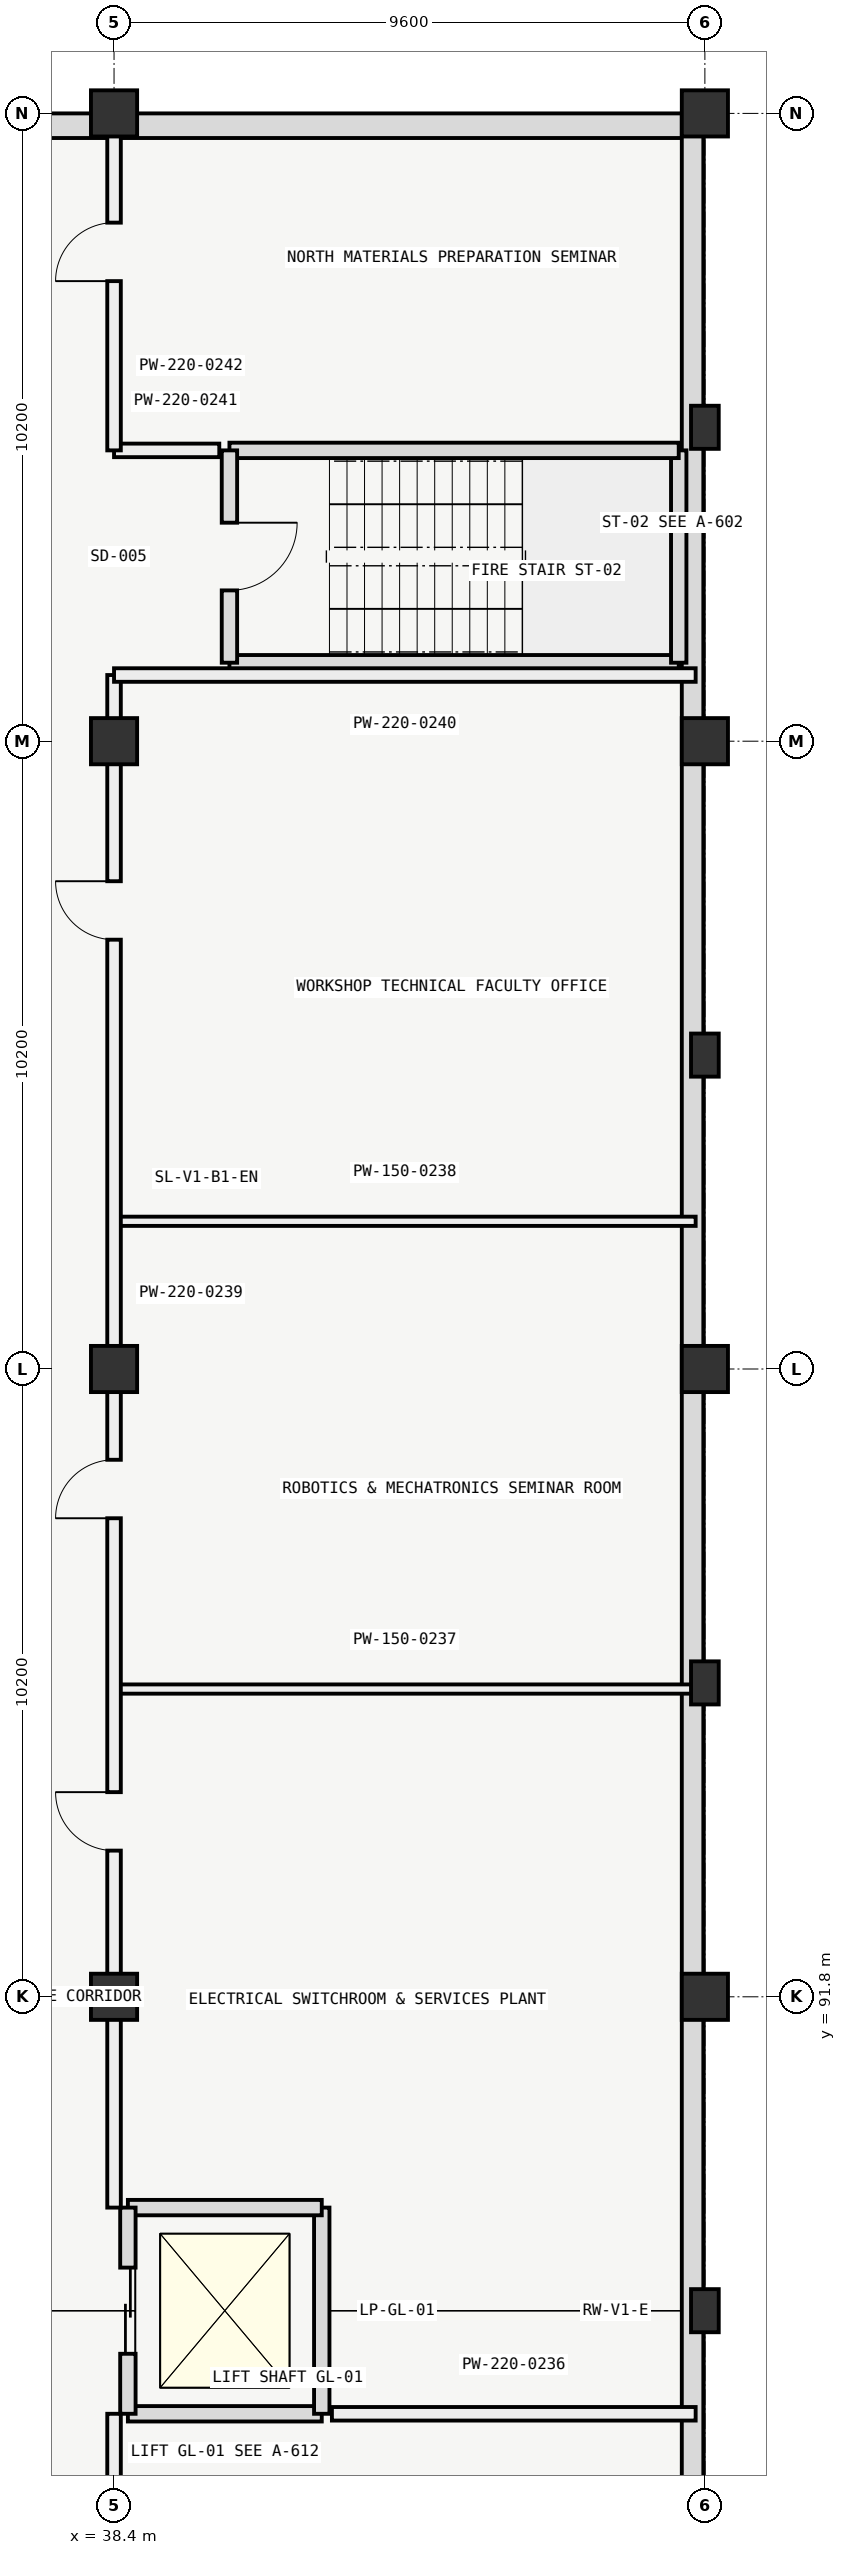
"""IFC4 building model, lengths in metres.
Left out: names, types, materials, properties, quantities, classifications, styles, units other than length and angle.
Written with IfcOpenShell. Run it as: python <this file> out.ifc"""

import sys

from ifc_helpers import new_model, si_unit, direction, frame, frame_2d, origin, origin_2d, place, context, subcontext, project, spatial, rectangle, extrude, element, fill, save


model = new_model("IFC4")
c1 = context("Model", 3, precision=1e-05, world=origin(), true_north=direction((0.0, 1.0)))
c2 = subcontext(c1, "Body", "Model", "MODEL_VIEW")
j1 = project(units=[si_unit("LENGTHUNIT", "METRE"), si_unit("PLANEANGLEUNIT", "RADIAN")], contexts=[c1])
p1 = place(None, origin())
s1 = spatial("IfcSite", under=j1, at=p1, CompositionType="ELEMENT")
p2 = place(p1, origin())
s2 = spatial("IfcBuilding", under=s1, at=p2, CompositionType="ELEMENT")
p3 = place(p2, frame((0.0, 0.0, -4.2)))
s3 = spatial("IfcBuildingStorey", under=s2, at=p3, CompositionType="ELEMENT", Elevation=-4.2)
for number, where, z_axis, x_axis in (
    (1, (38.4, 91.8, 0.0), (0.0, 0.0, 1.0), (1.0, 0.0, 0.0)),
    (2, (48.0, 91.8, 0.0), (0.0, 0.0, 1.0), (1.0, 0.0, 0.0)),
    (3, (38.4, 102.0, 0.0), (0.0, 0.0, 1.0), (1.0, 0.0, 0.0)),
    (4, (48.0, 102.0, 0.0), (0.0, 0.0, 1.0), (1.0, 0.0, 0.0)),
    (5, (38.4, 112.2, 0.0), (0.0, 0.0, 1.0), (1.0, 0.0, 0.0)),
    (6, (48.0, 112.2, 0.0), (0.0, 0.0, 1.0), (1.0, 0.0, 0.0)),
    (7, (38.4, 122.4, 0.0), (0.0, 0.0, 1.0), (1.0, 0.0, 0.0)),
    (8, (48.0, 122.4, 0.0), (0.0, 0.0, 1.0), (1.0, 0.0, 0.0)),
):
    element("IfcColumn", number, at=place(p3, frame(where, z_axis=z_axis, x_axis=x_axis)), inside=s3, PredefinedType="COLUMN", context=c2, shape_type="SweptSolid", body=[
        extrude(rectangle(XDim=0.75, YDim=0.75, at=origin_2d()), origin(), (0.0, 0.0, 1.0), 4.2),
    ])
for number, where, z_axis, x_axis in (
    (9, (48.0, 86.7, 0.0), (0.0, 0.0, 1.0), (1.0, 0.0, 0.0)),
    (10, (48.0, 96.9, 0.0), (0.0, 0.0, 1.0), (1.0, 0.0, 0.0)),
    (11, (48.0, 107.1, 0.0), (0.0, 0.0, 1.0), (1.0, 0.0, 0.0)),
    (12, (48.0, 117.3, 0.0), (0.0, 0.0, 1.0), (1.0, 0.0, 0.0)),
):
    element("IfcColumn", number, at=place(p3, frame(where, z_axis=z_axis, x_axis=x_axis)), inside=s3, PredefinedType="PILASTER", context=c2, shape_type="SweptSolid", body=[
        extrude(rectangle(XDim=0.45, YDim=0.7, at=origin_2d()), origin(), (0.0, 0.0, 1.0), 4.2),
    ])
p4 = place(p3, frame((0.2, 122.2, 0.0), z_axis=(0.0, 0.0, 1.0), x_axis=(1.0, 0.0, 0.0)))
e13 = element("IfcWall", 13, at=p4, inside=s3, PredefinedType="USERDEFINED", context=c2, shape_type="SweptSolid", body=[
    extrude(rectangle(XDim=47.6, YDim=0.4, at=frame_2d((23.8, 0.0))), origin(), (0.0, 0.0, 1.0), 3.9),
])
p5 = place(p3, frame((47.8, 51.0, 0.0), z_axis=(0.0, 0.0, 1.0), x_axis=(0.0, 1.0, 0.0)))
e14 = element("IfcWall", 14, at=p5, inside=s3, PredefinedType="USERDEFINED", context=c2, shape_type="SweptSolid", body=[
    extrude(rectangle(XDim=71.4, YDim=0.35, at=frame_2d((35.7, 0.0))), origin(), (0.0, 0.0, 1.0), 3.9),
])
p6 = place(p3, frame((40.275, 113.475, 0.0), z_axis=(0.0, 0.0, 1.0), x_axis=(1.0, 0.0, 0.0)))
e15 = element("IfcWall", 15, at=p6, inside=s3, PredefinedType="SOLIDWALL", context=c2, shape_type="SweptSolid", body=[
    extrude(rectangle(XDim=7.3, YDim=0.25, at=frame_2d((3.65, 0.0))), origin(), (0.0, 0.0, 1.0), 3.9),
])
p7 = place(p3, frame((47.575, 113.475, 0.0), z_axis=(0.0, 0.0, 1.0), x_axis=(0.0, 1.0, 0.0)))
e16 = element("IfcWall", 16, at=p7, inside=s3, PredefinedType="SOLIDWALL", context=c2, shape_type="SweptSolid", body=[
    extrude(rectangle(XDim=3.45, YDim=0.25, at=frame_2d((1.725, 0.0))), origin(), (0.0, 0.0, 1.0), 3.9),
])
p8 = place(p3, frame((47.575, 116.925, 0.0), z_axis=(0.0, 0.0, 1.0), x_axis=(-1.0, 0.0, 0.0)))
e17 = element("IfcWall", 17, at=p8, inside=s3, PredefinedType="SOLIDWALL", context=c2, shape_type="SweptSolid", body=[
    extrude(rectangle(XDim=7.3, YDim=0.25, at=frame_2d((3.65, 0.0))), origin(), (0.0, 0.0, 1.0), 3.9),
])
p9 = place(p3, frame((40.275, 116.925, 0.0), z_axis=(0.0, 0.0, 1.0), x_axis=(0.0, -1.0, 0.0)))
e18 = element("IfcWall", 18, at=p9, inside=s3, PredefinedType="SOLIDWALL", context=c2, shape_type="SweptSolid", body=[
    extrude(rectangle(XDim=3.45, YDim=0.25, at=frame_2d((1.725, 0.0))), origin(), (0.0, 0.0, 1.0), 3.9),
])
p10 = place(p9, frame((1.175, 0.0, 0.0)))
e19 = element("IfcOpeningElement", 19, at=p10, cuts=e18, PredefinedType="OPENING", context=c2, shape_type="SweptSolid", body=[
    extrude(rectangle(XDim=1.1, YDim=2.2, at=frame_2d((0.55, 1.1))), frame((0.0, 0.135, 0.0), z_axis=(0.0, -1.0, 0.0), x_axis=(1.0, 0.0, 0.0)), (0.0, 0.0, 1.0), 0.27),
])
p11 = place(p3, frame((38.625, 85.025, -0.3), z_axis=(0.0, 0.0, 1.0), x_axis=(1.0, 0.0, 0.0)))
e20 = element("IfcWall", 20, at=p11, inside=s3, PredefinedType="SOLIDWALL", context=c2, shape_type="SweptSolid", body=[
    extrude(rectangle(XDim=3.15, YDim=0.25, at=frame_2d((1.575, 0.0))), origin(), (0.0, 0.0, 1.0), 4.2),
])
p12 = place(p3, frame((41.775, 85.025, -0.3), z_axis=(0.0, 0.0, 1.0), x_axis=(0.0, 1.0, 0.0)))
e21 = element("IfcWall", 21, at=p12, inside=s3, PredefinedType="SOLIDWALL", context=c2, shape_type="SweptSolid", body=[
    extrude(rectangle(XDim=3.35, YDim=0.25, at=frame_2d((1.675, 0.0))), origin(), (0.0, 0.0, 1.0), 4.2),
])
p13 = place(p3, frame((41.775, 88.375, -0.3), z_axis=(0.0, 0.0, 1.0), x_axis=(-1.0, 0.0, 0.0)))
e22 = element("IfcWall", 22, at=p13, inside=s3, PredefinedType="SOLIDWALL", context=c2, shape_type="SweptSolid", body=[
    extrude(rectangle(XDim=3.15, YDim=0.25, at=frame_2d((1.575, 0.0))), origin(), (0.0, 0.0, 1.0), 4.2),
])
p14 = place(p3, frame((38.625, 88.375, -0.3), z_axis=(0.0, 0.0, 1.0), x_axis=(0.0, -1.0, 0.0)))
e23 = element("IfcWall", 23, at=p14, inside=s3, PredefinedType="SOLIDWALL", context=c2, shape_type="SweptSolid", body=[
    extrude(rectangle(XDim=3.35, YDim=0.25, at=frame_2d((1.675, 0.0))), origin(), (0.0, 0.0, 1.0), 4.2),
])
p15 = place(p14, frame((0.975, 0.0, 0.3)))
e24 = element("IfcOpeningElement", 24, at=p15, cuts=e23, PredefinedType="OPENING", context=c2, shape_type="SweptSolid", body=[
    extrude(rectangle(XDim=1.4, YDim=2.2, at=frame_2d((0.7, 1.1))), frame((0.0, 0.135, 0.0), z_axis=(0.0, -1.0, 0.0), x_axis=(1.0, 0.0, 0.0)), (0.0, 0.0, 1.0), 0.27),
])
p16 = place(p3, frame((38.4, 58.325, 0.0), z_axis=(0.0, 0.0, 1.0), x_axis=(0.0, 1.0, 0.0)))
e25 = element("IfcWall", 25, at=p16, inside=s3, PredefinedType="PARTITIONING", context=c2, shape_type="SweptSolid", body=[
    extrude(rectangle(XDim=26.7, YDim=0.22, at=frame_2d((13.35, 0.0))), origin(), (0.0, 0.0, 1.0), 3.268),
])
p17 = place(p16, frame((1.35, 0.0, 0.0)))
e26 = element("IfcOpeningElement", 26, at=p17, cuts=e25, PredefinedType="OPENING", context=c2, shape_type="SweptSolid", body=[
    extrude(rectangle(XDim=0.95, YDim=2.1, at=frame_2d((0.475, 1.05))), frame((0.0, 0.12, 0.0), z_axis=(0.0, -1.0, 0.0), x_axis=(1.0, 0.0, 0.0)), (0.0, 0.0, 1.0), 0.24),
])
p18 = place(p16, frame((6.08, 0.0, 0.0)))
e27 = element("IfcOpeningElement", 27, at=p18, cuts=e25, PredefinedType="OPENING", context=c2, shape_type="SweptSolid", body=[
    extrude(rectangle(XDim=0.9, YDim=2.05, at=frame_2d((0.45, 1.025))), frame((0.0, 0.12, 0.0), z_axis=(0.0, -1.0, 0.0), x_axis=(1.0, 0.0, 0.0)), (0.0, 0.0, 1.0), 0.24),
])
p19 = place(p16, frame((10.6, 0.0, 0.0)))
e28 = element("IfcOpeningElement", 28, at=p19, cuts=e25, PredefinedType="OPENING", context=c2, shape_type="SweptSolid", body=[
    extrude(rectangle(XDim=0.95, YDim=2.1, at=frame_2d((0.475, 1.05))), frame((0.0, 0.12, 0.0), z_axis=(0.0, -1.0, 0.0), x_axis=(1.0, 0.0, 0.0)), (0.0, 0.0, 1.0), 0.24),
])
p20 = place(p16, frame((20.3, 0.0, 0.0)))
e29 = element("IfcOpeningElement", 29, at=p20, cuts=e25, PredefinedType="OPENING", context=c2, shape_type="SweptSolid", body=[
    extrude(rectangle(XDim=0.95, YDim=2.1, at=frame_2d((0.475, 1.05))), frame((0.0, 0.12, 0.0), z_axis=(0.0, -1.0, 0.0), x_axis=(1.0, 0.0, 0.0)), (0.0, 0.0, 1.0), 0.24),
])
p21 = place(p3, frame((41.94, 85.025, 0.0), z_axis=(0.0, 0.0, 1.0), x_axis=(1.0, 0.0, 0.0)))
e30 = element("IfcWall", 30, at=p21, inside=s3, PredefinedType="PARTITIONING", context=c2, shape_type="SweptSolid", body=[
    extrude(rectangle(XDim=5.91, YDim=0.22, at=frame_2d((2.955, 0.0))), origin(), (0.0, 0.0, 1.0), 3.23),
])
for number, where, z_axis, x_axis in (
    (31, (38.4, 96.8, 0.0), (0.0, 0.0, 1.0), (1.0, 0.0, 0.0)),
    (32, (38.4, 104.4, 0.0), (0.0, 0.0, 1.0), (1.0, 0.0, 0.0)),
):
    element("IfcWall", number, at=place(p3, frame(where, z_axis=z_axis, x_axis=x_axis)), inside=s3, PredefinedType="PARTITIONING", context=c2, shape_type="SweptSolid", body=[
        extrude(rectangle(XDim=9.45, YDim=0.15, at=frame_2d((4.725, 0.0))), origin(), (0.0, 0.0, 1.0), 3.423),
    ])
p22 = place(p3, frame((38.4, 88.375, 0.0), z_axis=(0.0, 0.0, 1.0), x_axis=(0.0, 1.0, 0.0)))
e33 = element("IfcWall", 33, at=p22, inside=s3, PredefinedType="PARTITIONING", context=c2, shape_type="SweptSolid", body=[
    extrude(rectangle(XDim=24.9, YDim=0.22, at=frame_2d((12.45, 0.0))), origin(), (0.0, 0.0, 1.0), 3.268),
])
p23 = place(p22, frame((5.8, 0.0, 0.0)))
e34 = element("IfcOpeningElement", 34, at=p23, cuts=e33, PredefinedType="OPENING", context=c2, shape_type="SweptSolid", body=[
    extrude(rectangle(XDim=0.95, YDim=2.1, at=frame_2d((0.475, 1.05))), frame((0.0, 0.12, 0.0), z_axis=(0.0, -1.0, 0.0), x_axis=(1.0, 0.0, 0.0)), (0.0, 0.0, 1.0), 0.24),
])
p24 = place(p22, frame((11.2, 0.0, 0.0)))
e35 = element("IfcOpeningElement", 35, at=p24, cuts=e33, PredefinedType="OPENING", context=c2, shape_type="SweptSolid", body=[
    extrude(rectangle(XDim=0.95, YDim=2.1, at=frame_2d((0.475, 1.05))), frame((0.0, 0.12, 0.0), z_axis=(0.0, -1.0, 0.0), x_axis=(1.0, 0.0, 0.0)), (0.0, 0.0, 1.0), 0.24),
])
p25 = place(p22, frame((20.6, 0.0, 0.0)))
e36 = element("IfcOpeningElement", 36, at=p25, cuts=e33, PredefinedType="OPENING", context=c2, shape_type="SweptSolid", body=[
    extrude(rectangle(XDim=0.95, YDim=2.1, at=frame_2d((0.475, 1.05))), frame((0.0, 0.12, 0.0), z_axis=(0.0, -1.0, 0.0), x_axis=(1.0, 0.0, 0.0)), (0.0, 0.0, 1.0), 0.24),
])
p26 = place(p3, frame((38.4, 113.275, 0.0), z_axis=(0.0, 0.0, 1.0), x_axis=(1.0, 0.0, 0.0)))
e37 = element("IfcWall", 37, at=p26, inside=s3, PredefinedType="PARTITIONING", context=c2, shape_type="SweptSolid", body=[
    extrude(rectangle(XDim=9.45, YDim=0.22, at=frame_2d((4.725, 0.0))), origin(), (0.0, 0.0, 1.0), 3.23),
])
p27 = place(p3, frame((38.4, 116.925, 0.0), z_axis=(0.0, 0.0, 1.0), x_axis=(1.0, 0.0, 0.0)))
e38 = element("IfcWall", 38, at=p27, inside=s3, PredefinedType="PARTITIONING", context=c2, shape_type="SweptSolid", body=[
    extrude(rectangle(XDim=1.71, YDim=0.22, at=frame_2d((0.855, 0.0))), origin(), (0.0, 0.0, 1.0), 3.423),
])
p28 = place(p3, frame((38.4, 116.925, 0.0), z_axis=(0.0, 0.0, 1.0), x_axis=(0.0, 1.0, 0.0)))
e39 = element("IfcWall", 39, at=p28, inside=s3, PredefinedType="PARTITIONING", context=c2, shape_type="SweptSolid", body=[
    extrude(rectangle(XDim=5.325, YDim=0.22, at=frame_2d((2.663, 0.0))), origin(), (0.0, 0.0, 1.0), 3.423),
])
p29 = place(p28, frame((2.75, 0.0, 0.0)))
e40 = element("IfcOpeningElement", 40, at=p29, cuts=e39, PredefinedType="OPENING", context=c2, shape_type="SweptSolid", body=[
    extrude(rectangle(XDim=0.95, YDim=2.1, at=frame_2d((0.475, 1.05))), frame((0.0, 0.12, 0.0), z_axis=(0.0, -1.0, 0.0), x_axis=(1.0, 0.0, 0.0)), (0.0, 0.0, 1.0), 0.24),
])
p30 = place(p10, origin())
e41 = element("IfcDoor", 41, at=p30, inside=s3, OperationType="SINGLE_SWING_LEFT", PredefinedType="DOOR", context=c2, shape_type="SweptSolid", body=[
    extrude(rectangle(XDim=1.1, YDim=2.2, at=frame_2d((0.55, 1.1))), frame((0.0, 0.025, 0.0), z_axis=(0.0, -1.0, 0.0), x_axis=(1.0, 0.0, 0.0)), (0.0, 0.0, 1.0), 0.05),
])
fill(e19, e41)
p31 = place(p15, origin())
e42 = element("IfcDoor", 42, at=p31, inside=s3, OperationType="DOUBLE_DOOR_SLIDING", PredefinedType="DOOR", context=c2, shape_type="SweptSolid", body=[
    extrude(rectangle(XDim=1.4, YDim=2.2, at=frame_2d((0.7, 1.1))), frame((0.0, 0.025, 0.0), z_axis=(0.0, -1.0, 0.0), x_axis=(1.0, 0.0, 0.0)), (0.0, 0.0, 1.0), 0.05),
])
fill(e24, e42)
p32 = place(p23, origin())
e43 = element("IfcDoor", 43, at=p32, inside=s3, OperationType="SINGLE_SWING_RIGHT", PredefinedType="DOOR", context=c2, shape_type="SweptSolid", body=[
    extrude(rectangle(XDim=0.95, YDim=2.1, at=frame_2d((0.475, 1.05))), frame((0.0, 0.025, 0.0), z_axis=(0.0, -1.0, 0.0), x_axis=(1.0, 0.0, 0.0)), (0.0, 0.0, 1.0), 0.05),
])
fill(e34, e43)
p33 = place(p24, origin())
e44 = element("IfcDoor", 44, at=p33, inside=s3, OperationType="SINGLE_SWING_LEFT", PredefinedType="DOOR", context=c2, shape_type="SweptSolid", body=[
    extrude(rectangle(XDim=0.95, YDim=2.1, at=frame_2d((0.475, 1.05))), frame((0.0, 0.025, 0.0), z_axis=(0.0, -1.0, 0.0), x_axis=(1.0, 0.0, 0.0)), (0.0, 0.0, 1.0), 0.05),
])
fill(e35, e44)
p34 = place(p25, origin())
e45 = element("IfcDoor", 45, at=p34, inside=s3, OperationType="SINGLE_SWING_RIGHT", PredefinedType="DOOR", context=c2, shape_type="SweptSolid", body=[
    extrude(rectangle(XDim=0.95, YDim=2.1, at=frame_2d((0.475, 1.05))), frame((0.0, 0.025, 0.0), z_axis=(0.0, -1.0, 0.0), x_axis=(1.0, 0.0, 0.0)), (0.0, 0.0, 1.0), 0.05),
])
fill(e36, e45)
p35 = place(p29, origin())
e46 = element("IfcDoor", 46, at=p35, inside=s3, OperationType="SINGLE_SWING_LEFT", PredefinedType="DOOR", context=c2, shape_type="SweptSolid", body=[
    extrude(rectangle(XDim=0.95, YDim=2.1, at=frame_2d((0.475, 1.05))), frame((0.0, 0.025, 0.0), z_axis=(0.0, -1.0, 0.0), x_axis=(1.0, 0.0, 0.0)), (0.0, 0.0, 1.0), 0.05),
])
fill(e40, e46)
save(model, sys.argv[1])
